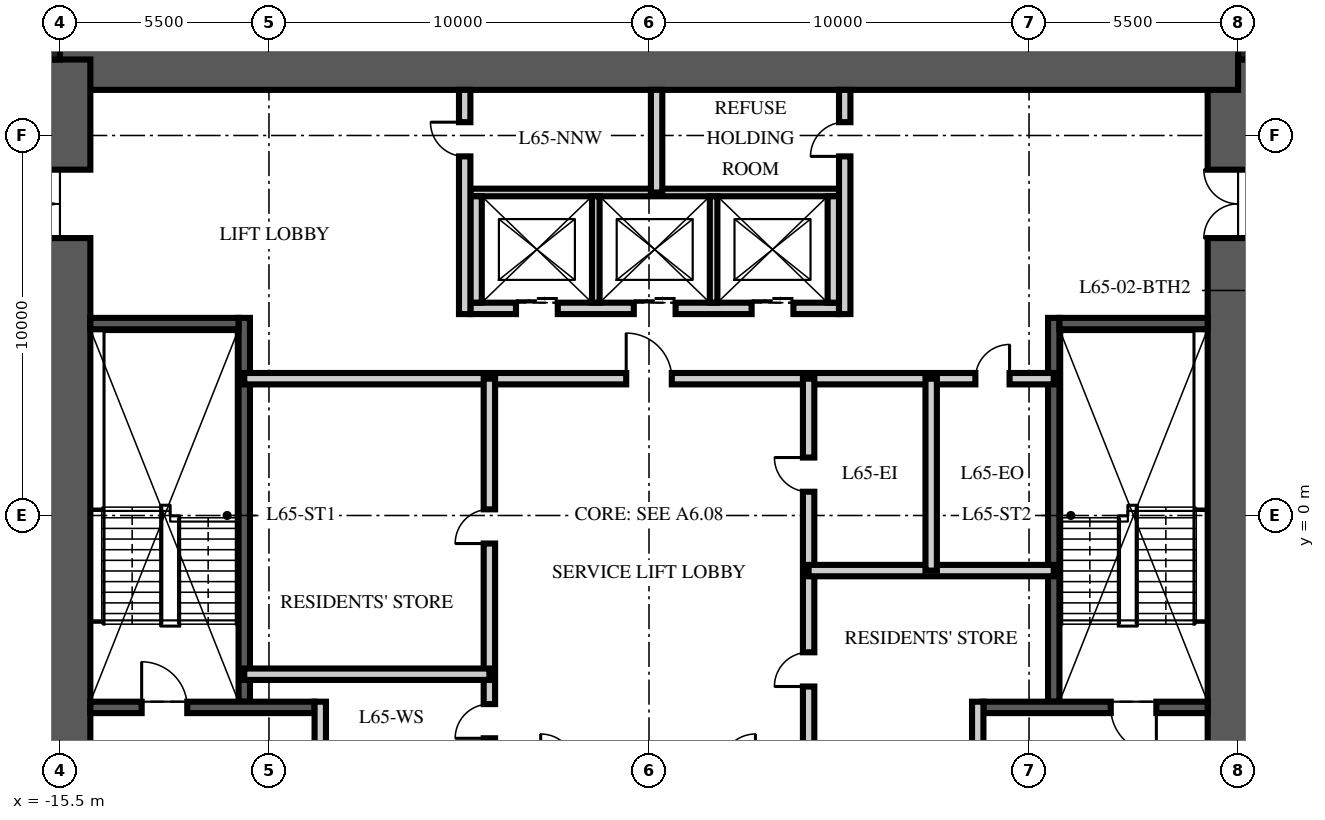
"""IFC4 building model, lengths in metres.
Left out: names, types, materials, properties, quantities, classifications, styles, units other than length and angle.
Written with IfcOpenShell. Run it as: python <this file> out.ifc"""

import sys

from ifc_helpers import new_model, si_unit, direction, frame, frame_2d, origin, origin_2d, place, context, subcontext, project, spatial, rectangle, extrude, element, fill, save


model = new_model("IFC4")
c1 = context("Model", 3, precision=1e-05, world=origin(), true_north=direction((0.0, 1.0)))
c2 = subcontext(c1, "Body", "Model", "MODEL_VIEW")
j1 = project(units=[si_unit("LENGTHUNIT", "METRE"), si_unit("PLANEANGLEUNIT", "RADIAN")], contexts=[c1])
p1 = place(None, origin())
s1 = spatial("IfcSite", under=j1, at=p1, CompositionType="ELEMENT")
p2 = place(p1, origin())
s2 = spatial("IfcBuilding", under=s1, at=p2, CompositionType="ELEMENT")
p3 = place(p2, frame((0.0, 0.0, 259.5)))
s3 = spatial("IfcBuildingStorey", under=s2, at=p3, CompositionType="ELEMENT", Elevation=259.5)
p4 = place(p3, frame((15.5, -12.0, -0.25), z_axis=(0.0, 0.0, 1.0), x_axis=(0.0, 1.0, 0.0)))
e1 = element("IfcWall", 1, at=p4, inside=s3, PredefinedType="SHEAR", context=c2, shape_type="SweptSolid", body=[
    extrude(rectangle(XDim=24.0, YDim=1.6, at=frame_2d((12.0, 0.0))), origin(), (0.0, 0.0, 1.0), 3.75),
])
p5 = place(p4, frame((3.2, 0.0, 0.25)))
e2 = element("IfcOpeningElement", 2, at=p5, cuts=e1, PredefinedType="OPENING", context=c2, shape_type="SweptSolid", body=[
    extrude(rectangle(XDim=1.2, YDim=2.1, at=frame_2d((0.6, 1.05))), frame((0.0, 0.81, 0.0), z_axis=(0.0, -1.0, 0.0), x_axis=(1.0, 0.0, 0.0)), (0.0, 0.0, 1.0), 1.62),
])
p6 = place(p4, frame((19.3, 0.0, 0.25)))
e3 = element("IfcOpeningElement", 3, at=p6, cuts=e1, PredefinedType="OPENING", context=c2, shape_type="SweptSolid", body=[
    extrude(rectangle(XDim=1.8, YDim=2.1, at=frame_2d((0.9, 1.05))), frame((0.0, 0.81, 0.0), z_axis=(0.0, -1.0, 0.0), x_axis=(1.0, 0.0, 0.0)), (0.0, 0.0, 1.0), 1.62),
])
p7 = place(p3, frame((-15.5, 12.0, -0.25), z_axis=(0.0, 0.0, 1.0), x_axis=(1.0, 0.0, 0.0)))
e4 = element("IfcWall", 4, at=p7, inside=s3, PredefinedType="SHEAR", context=c2, shape_type="SweptSolid", body=[
    extrude(rectangle(XDim=31.0, YDim=1.6, at=frame_2d((15.5, 0.0))), origin(), (0.0, 0.0, 1.0), 3.75),
])
p8 = place(p3, frame((-15.5, -12.0, -0.25), z_axis=(0.0, 0.0, 1.0), x_axis=(0.0, 1.0, 0.0)))
e5 = element("IfcWall", 5, at=p8, inside=s3, PredefinedType="SHEAR", context=c2, shape_type="SweptSolid", body=[
    extrude(rectangle(XDim=24.0, YDim=1.6, at=frame_2d((12.0, 0.0))), origin(), (0.0, 0.0, 1.0), 3.75),
])
p9 = place(p8, frame((3.2, 0.0, 0.25)))
e6 = element("IfcOpeningElement", 6, at=p9, cuts=e5, PredefinedType="OPENING", context=c2, shape_type="SweptSolid", body=[
    extrude(rectangle(XDim=1.2, YDim=2.1, at=frame_2d((0.6, 1.05))), frame((0.0, 0.81, 0.0), z_axis=(0.0, -1.0, 0.0), x_axis=(1.0, 0.0, 0.0)), (0.0, 0.0, 1.0), 1.62),
])
p10 = place(p8, frame((19.3, 0.0, 0.25)))
e7 = element("IfcOpeningElement", 7, at=p10, cuts=e5, PredefinedType="OPENING", context=c2, shape_type="SweptSolid", body=[
    extrude(rectangle(XDim=1.8, YDim=2.1, at=frame_2d((0.9, 1.05))), frame((0.0, 0.81, 0.0), z_axis=(0.0, -1.0, 0.0), x_axis=(1.0, 0.0, 0.0)), (0.0, 0.0, 1.0), 1.62),
])
for number, where, z_axis, x_axis in (
    (8, (15.9, 12.4, -0.25), (0.0, 0.0, 1.0), (1.0, 0.0, 0.0)),
    (9, (-15.9, 12.4, -0.25), (0.0, 0.0, 1.0), (1.0, 0.0, 0.0)),
):
    element("IfcColumn", number, at=place(p3, frame(where, z_axis=z_axis, x_axis=x_axis)), inside=s3, PredefinedType="COLUMN", context=c2, shape_type="SweptSolid", body=[
        extrude(rectangle(XDim=0.8, YDim=0.8, at=origin_2d()), origin(), (0.0, 0.0, 1.0), 3.75),
    ])
p11 = place(p3, frame((-10.65, -4.9, 0.0), z_axis=(0.0, 0.0, 1.0), x_axis=(0.0, 1.0, 0.0)))
e10 = element("IfcWall", 10, at=p11, inside=s3, PredefinedType="SOLIDWALL", context=c2, shape_type="SweptSolid", body=[
    extrude(rectangle(XDim=10.1, YDim=0.3, at=frame_2d((5.05, 0.0))), origin(), (0.0, 0.0, 1.0), 3.5),
])
p12 = place(p3, frame((-14.7, -5.05, 0.0), z_axis=(0.0, 0.0, 1.0), x_axis=(1.0, 0.0, 0.0)))
e11 = element("IfcWall", 11, at=p12, inside=s3, PredefinedType="SOLIDWALL", context=c2, shape_type="SweptSolid", body=[
    extrude(rectangle(XDim=5.9, YDim=0.3, at=frame_2d((2.95, 0.0))), origin(), (0.0, 0.0, 1.0), 3.5),
])
p13 = place(p12, frame((1.35, 0.0, 0.0)))
e12 = element("IfcOpeningElement", 12, at=p13, cuts=e11, PredefinedType="OPENING", context=c2, shape_type="SweptSolid", body=[
    extrude(rectangle(XDim=1.2, YDim=2.1, at=frame_2d((0.6, 1.05))), frame((0.0, 0.16, 0.0), z_axis=(0.0, -1.0, 0.0), x_axis=(1.0, 0.0, 0.0)), (0.0, 0.0, 1.0), 0.32),
])
p14 = place(p3, frame((-14.7, 5.05, 0.0), z_axis=(0.0, 0.0, 1.0), x_axis=(1.0, 0.0, 0.0)))
e13 = element("IfcWall", 13, at=p14, inside=s3, PredefinedType="SOLIDWALL", context=c2, shape_type="SweptSolid", body=[
    extrude(rectangle(XDim=3.9, YDim=0.3, at=frame_2d((1.95, 0.0))), origin(), (0.0, 0.0, 1.0), 3.5),
])
p15 = place(p3, frame((-8.65, -11.2, 0.0), z_axis=(0.0, 0.0, 1.0), x_axis=(0.0, 1.0, 0.0)))
e14 = element("IfcWall", 14, at=p15, inside=s3, PredefinedType="PARTITIONING", context=c2, shape_type="SweptSolid", body=[
    extrude(rectangle(XDim=6.3, YDim=0.3, at=frame_2d((3.15, 0.0))), origin(), (0.0, 0.0, 1.0), 3.5),
])
p16 = place(p15, frame((2.45, 0.0, 0.0)))
e15 = element("IfcOpeningElement", 15, at=p16, cuts=e14, PredefinedType="OPENING", context=c2, shape_type="SweptSolid", body=[
    extrude(rectangle(XDim=1.1, YDim=2.1, at=frame_2d((0.55, 1.05))), frame((0.0, 0.16, 0.0), z_axis=(0.0, -1.0, 0.0), x_axis=(1.0, 0.0, 0.0)), (0.0, 0.0, 1.0), 0.32),
])
p17 = place(p3, frame((10.65, -4.9, 0.0), z_axis=(0.0, 0.0, 1.0), x_axis=(0.0, 1.0, 0.0)))
e16 = element("IfcWall", 16, at=p17, inside=s3, PredefinedType="SOLIDWALL", context=c2, shape_type="SweptSolid", body=[
    extrude(rectangle(XDim=10.1, YDim=0.3, at=frame_2d((5.05, 0.0))), origin(), (0.0, 0.0, 1.0), 3.5),
])
p18 = place(p3, frame((14.7, -5.05, 0.0), z_axis=(0.0, 0.0, 1.0), x_axis=(-1.0, 0.0, 0.0)))
e17 = element("IfcWall", 17, at=p18, inside=s3, PredefinedType="SOLIDWALL", context=c2, shape_type="SweptSolid", body=[
    extrude(rectangle(XDim=5.9, YDim=0.3, at=frame_2d((2.95, 0.0))), origin(), (0.0, 0.0, 1.0), 3.5),
])
p19 = place(p18, frame((1.35, 0.0, 0.0)))
e18 = element("IfcOpeningElement", 18, at=p19, cuts=e17, PredefinedType="OPENING", context=c2, shape_type="SweptSolid", body=[
    extrude(rectangle(XDim=1.2, YDim=2.1, at=frame_2d((0.6, 1.05))), frame((0.0, 0.16, 0.0), z_axis=(0.0, -1.0, 0.0), x_axis=(1.0, 0.0, 0.0)), (0.0, 0.0, 1.0), 0.32),
])
p20 = place(p3, frame((14.7, 5.05, 0.0), z_axis=(0.0, 0.0, 1.0), x_axis=(-1.0, 0.0, 0.0)))
e19 = element("IfcWall", 19, at=p20, inside=s3, PredefinedType="SOLIDWALL", context=c2, shape_type="SweptSolid", body=[
    extrude(rectangle(XDim=3.9, YDim=0.3, at=frame_2d((1.95, 0.0))), origin(), (0.0, 0.0, 1.0), 3.5),
])
p21 = place(p3, frame((8.65, -11.2, 0.0), z_axis=(0.0, 0.0, 1.0), x_axis=(0.0, 1.0, 0.0)))
e20 = element("IfcWall", 20, at=p21, inside=s3, PredefinedType="PARTITIONING", context=c2, shape_type="SweptSolid", body=[
    extrude(rectangle(XDim=6.3, YDim=0.3, at=frame_2d((3.15, 0.0))), origin(), (0.0, 0.0, 1.0), 3.5),
])
p22 = place(p21, frame((2.45, 0.0, 0.0)))
e21 = element("IfcOpeningElement", 21, at=p22, cuts=e20, PredefinedType="OPENING", context=c2, shape_type="SweptSolid", body=[
    extrude(rectangle(XDim=1.1, YDim=2.1, at=frame_2d((0.55, 1.05))), frame((0.0, 0.16, 0.0), z_axis=(0.0, -1.0, 0.0), x_axis=(1.0, 0.0, 0.0)), (0.0, 0.0, 1.0), 0.32),
])
p23 = place(p3, frame((-4.7, 5.45, 0.0), z_axis=(0.0, 0.0, 1.0), x_axis=(1.0, 0.0, 0.0)))
e22 = element("IfcWall", 22, at=p23, inside=s3, PredefinedType="PARTITIONING", context=c2, shape_type="SweptSolid", body=[
    extrude(rectangle(XDim=9.7, YDim=0.3, at=frame_2d((4.85, 0.0))), origin(), (0.0, 0.0, 1.0), 3.5),
])
p24 = place(p23, frame((1.2, 0.0, 0.0)))
e23 = element("IfcOpeningElement", 23, at=p24, cuts=e22, PredefinedType="OPENING", context=c2, shape_type="SweptSolid", body=[
    extrude(rectangle(XDim=1.1, YDim=2.1, at=frame_2d((0.55, 1.05))), frame((0.0, 0.16, 0.0), z_axis=(0.0, -1.0, 0.0), x_axis=(1.0, 0.0, 0.0)), (0.0, 0.0, 1.0), 0.32),
])
p25 = place(p23, frame((4.3, 0.0, 0.0)))
e24 = element("IfcOpeningElement", 24, at=p25, cuts=e22, PredefinedType="OPENING", context=c2, shape_type="SweptSolid", body=[
    extrude(rectangle(XDim=1.1, YDim=2.1, at=frame_2d((0.55, 1.05))), frame((0.0, 0.16, 0.0), z_axis=(0.0, -1.0, 0.0), x_axis=(1.0, 0.0, 0.0)), (0.0, 0.0, 1.0), 0.32),
])
p26 = place(p23, frame((7.4, 0.0, 0.0)))
e25 = element("IfcOpeningElement", 25, at=p26, cuts=e22, PredefinedType="OPENING", context=c2, shape_type="SweptSolid", body=[
    extrude(rectangle(XDim=1.1, YDim=2.1, at=frame_2d((0.55, 1.05))), frame((0.0, 0.16, 0.0), z_axis=(0.0, -1.0, 0.0), x_axis=(1.0, 0.0, 0.0)), (0.0, 0.0, 1.0), 0.32),
])
p27 = place(p3, frame((-4.7, 8.5, 0.0), z_axis=(0.0, 0.0, 1.0), x_axis=(1.0, 0.0, 0.0)))
e26 = element("IfcWall", 26, at=p27, inside=s3, PredefinedType="PARTITIONING", context=c2, shape_type="SweptSolid", body=[
    extrude(rectangle(XDim=9.7, YDim=0.2, at=frame_2d((4.85, 0.0))), origin(), (0.0, 0.0, 1.0), 3.5),
])
for number, where, z_axis, x_axis in (
    (27, (-4.55, 5.6, 0.0), (0.0, 0.0, 1.0), (0.0, 1.0, 0.0)),
    (28, (4.85, 5.6, 0.0), (0.0, 0.0, 1.0), (0.0, 1.0, 0.0)),
):
    element("IfcWall", number, at=place(p3, frame(where, z_axis=z_axis, x_axis=x_axis)), inside=s3, PredefinedType="PARTITIONING", context=c2, shape_type="SweptSolid", body=[
        extrude(rectangle(XDim=2.8, YDim=0.3, at=frame_2d((1.4, 0.0))), origin(), (0.0, 0.0, 1.0), 3.5),
    ])
for number, where, z_axis, x_axis in (
    (29, (-1.4, 5.6, 0.0), (0.0, 0.0, 1.0), (0.0, 1.0, 0.0)),
    (30, (1.7, 5.6, 0.0), (0.0, 0.0, 1.0), (0.0, 1.0, 0.0)),
):
    element("IfcWall", number, at=place(p3, frame(where, z_axis=z_axis, x_axis=x_axis)), inside=s3, PredefinedType="PARTITIONING", context=c2, shape_type="SweptSolid", body=[
        extrude(rectangle(XDim=2.8, YDim=0.2, at=frame_2d((1.4, 0.0))), origin(), (0.0, 0.0, 1.0), 3.5),
    ])
p28 = place(p3, frame((-10.65, 3.6, 0.0), z_axis=(0.0, 0.0, 1.0), x_axis=(1.0, 0.0, 0.0)))
e31 = element("IfcWall", 31, at=p28, inside=s3, PredefinedType="PARTITIONING", context=c2, shape_type="SweptSolid", body=[
    extrude(rectangle(XDim=21.3, YDim=0.3, at=frame_2d((10.65, 0.0))), origin(), (0.0, 0.0, 1.0), 3.5),
])
p29 = place(p28, frame((10.05, 0.0, 0.0)))
e32 = element("IfcOpeningElement", 32, at=p29, cuts=e31, PredefinedType="OPENING", context=c2, shape_type="SweptSolid", body=[
    extrude(rectangle(XDim=1.2, YDim=2.1, at=frame_2d((0.6, 1.05))), frame((0.0, 0.16, 0.0), z_axis=(0.0, -1.0, 0.0), x_axis=(1.0, 0.0, 0.0)), (0.0, 0.0, 1.0), 0.32),
])
p30 = place(p28, frame((19.238, 0.0, 0.0)))
e33 = element("IfcOpeningElement", 33, at=p30, cuts=e31, PredefinedType="OPENING", context=c2, shape_type="SweptSolid", body=[
    extrude(rectangle(XDim=0.9, YDim=2.1, at=frame_2d((0.45, 1.05))), frame((0.0, 0.16, 0.0), z_axis=(0.0, -1.0, 0.0), x_axis=(1.0, 0.0, 0.0)), (0.0, 0.0, 1.0), 0.32),
])
p31 = place(p3, frame((-4.2, -6.65, 0.0), z_axis=(0.0, 0.0, 1.0), x_axis=(0.0, 1.0, 0.0)))
e34 = element("IfcWall", 34, at=p31, inside=s3, PredefinedType="PARTITIONING", context=c2, shape_type="SweptSolid", body=[
    extrude(rectangle(XDim=10.25, YDim=0.3, at=frame_2d((5.125, 0.0))), origin(), (0.0, 0.0, 1.0), 3.5),
])
p32 = place(p31, frame((0.787, 0.0, 0.0)))
e35 = element("IfcOpeningElement", 35, at=p32, cuts=e34, PredefinedType="OPENING", context=c2, shape_type="SweptSolid", body=[
    extrude(rectangle(XDim=0.9, YDim=2.1, at=frame_2d((0.45, 1.05))), frame((0.0, 0.16, 0.0), z_axis=(0.0, -1.0, 0.0), x_axis=(1.0, 0.0, 0.0)), (0.0, 0.0, 1.0), 0.32),
])
p33 = place(p31, frame((5.912, 0.0, 0.0)))
e36 = element("IfcOpeningElement", 36, at=p33, cuts=e34, PredefinedType="OPENING", context=c2, shape_type="SweptSolid", body=[
    extrude(rectangle(XDim=0.9, YDim=2.1, at=frame_2d((0.45, 1.05))), frame((0.0, 0.16, 0.0), z_axis=(0.0, -1.0, 0.0), x_axis=(1.0, 0.0, 0.0)), (0.0, 0.0, 1.0), 0.32),
])
p34 = place(p3, frame((4.2, -6.65, 0.0), z_axis=(0.0, 0.0, 1.0), x_axis=(0.0, 1.0, 0.0)))
e37 = element("IfcWall", 37, at=p34, inside=s3, PredefinedType="PARTITIONING", context=c2, shape_type="SweptSolid", body=[
    extrude(rectangle(XDim=10.25, YDim=0.3, at=frame_2d((5.125, 0.0))), origin(), (0.0, 0.0, 1.0), 3.5),
])
p35 = place(p34, frame((2.15, 0.0, 0.0)))
e38 = element("IfcOpeningElement", 38, at=p35, cuts=e37, PredefinedType="OPENING", context=c2, shape_type="SweptSolid", body=[
    extrude(rectangle(XDim=0.9, YDim=2.1, at=frame_2d((0.45, 1.05))), frame((0.0, 0.16, 0.0), z_axis=(0.0, -1.0, 0.0), x_axis=(1.0, 0.0, 0.0)), (0.0, 0.0, 1.0), 0.32),
])
p36 = place(p34, frame((7.275, 0.0, 0.0)))
e39 = element("IfcOpeningElement", 39, at=p36, cuts=e37, PredefinedType="OPENING", context=c2, shape_type="SweptSolid", body=[
    extrude(rectangle(XDim=0.9, YDim=2.1, at=frame_2d((0.45, 1.05))), frame((0.0, 0.16, 0.0), z_axis=(0.0, -1.0, 0.0), x_axis=(1.0, 0.0, 0.0)), (0.0, 0.0, 1.0), 0.32),
])
for number, where, z_axis, x_axis in (
    (40, (-10.65, -4.177, 0.0), (0.0, 0.0, 1.0), (1.0, 0.0, 0.0)),
    (41, (10.65, -1.45, 0.0), (0.0, 0.0, 1.0), (-1.0, 0.0, 0.0)),
):
    element("IfcWall", number, at=place(p3, frame(where, z_axis=z_axis, x_axis=x_axis)), inside=s3, PredefinedType="PARTITIONING", context=c2, shape_type="SweptSolid", body=[
        extrude(rectangle(XDim=6.45, YDim=0.3, at=frame_2d((3.225, 0.0))), origin(), (0.0, 0.0, 1.0), 3.5),
    ])
p37 = place(p3, frame((7.425, -1.45, 0.0), z_axis=(0.0, 0.0, 1.0), x_axis=(0.0, 1.0, 0.0)))
e42 = element("IfcWall", 42, at=p37, inside=s3, PredefinedType="PARTITIONING", context=c2, shape_type="SweptSolid", body=[
    extrude(rectangle(XDim=5.05, YDim=0.3, at=frame_2d((2.525, 0.0))), origin(), (0.0, 0.0, 1.0), 3.5),
])
p38 = place(p3, frame((-4.85, 5.3, 0.0), z_axis=(0.0, 0.0, 1.0), x_axis=(0.0, 1.0, 0.0)))
e43 = element("IfcWall", 43, at=p38, inside=s3, PredefinedType="PARTITIONING", context=c2, shape_type="SweptSolid", body=[
    extrude(rectangle(XDim=5.9, YDim=0.3, at=frame_2d((2.95, 0.0))), origin(), (0.0, 0.0, 1.0), 3.5),
])
p39 = place(p38, frame((4.15, 0.0, 0.0)))
e44 = element("IfcOpeningElement", 44, at=p39, cuts=e43, PredefinedType="OPENING", context=c2, shape_type="SweptSolid", body=[
    extrude(rectangle(XDim=0.9, YDim=2.1, at=frame_2d((0.45, 1.05))), frame((0.0, 0.16, 0.0), z_axis=(0.0, -1.0, 0.0), x_axis=(1.0, 0.0, 0.0)), (0.0, 0.0, 1.0), 0.32),
])
p40 = place(p3, frame((5.15, 5.3, 0.0), z_axis=(0.0, 0.0, 1.0), x_axis=(0.0, 1.0, 0.0)))
e45 = element("IfcWall", 45, at=p40, inside=s3, PredefinedType="PARTITIONING", context=c2, shape_type="SweptSolid", body=[
    extrude(rectangle(XDim=5.9, YDim=0.3, at=frame_2d((2.95, 0.0))), origin(), (0.0, 0.0, 1.0), 3.5),
])
p41 = place(p40, frame((4.15, 0.0, 0.0)))
e46 = element("IfcOpeningElement", 46, at=p41, cuts=e45, PredefinedType="OPENING", context=c2, shape_type="SweptSolid", body=[
    extrude(rectangle(XDim=0.9, YDim=2.1, at=frame_2d((0.45, 1.05))), frame((0.0, 0.16, 0.0), z_axis=(0.0, -1.0, 0.0), x_axis=(1.0, 0.0, 0.0)), (0.0, 0.0, 1.0), 0.32),
])
p42 = place(p3, frame((0.2, 8.5, 0.0), z_axis=(0.0, 0.0, 1.0), x_axis=(0.0, 1.0, 0.0)))
e47 = element("IfcWall", 47, at=p42, inside=s3, PredefinedType="PARTITIONING", context=c2, shape_type="SweptSolid", body=[
    extrude(rectangle(XDim=2.7, YDim=0.3, at=frame_2d((1.35, 0.0))), origin(), (0.0, 0.0, 1.0), 3.5),
])
p43 = place(p13, origin())
e48 = element("IfcDoor", 48, at=p43, inside=s3, OperationType="SINGLE_SWING_LEFT", PredefinedType="DOOR", context=c2, shape_type="SweptSolid", body=[
    extrude(rectangle(XDim=1.2, YDim=2.1, at=frame_2d((0.6, 1.05))), frame((0.0, 0.025, 0.0), z_axis=(0.0, -1.0, 0.0), x_axis=(1.0, 0.0, 0.0)), (0.0, 0.0, 1.0), 0.05),
])
fill(e12, e48)
p44 = place(p10, origin())
e49 = element("IfcDoor", 49, at=p44, inside=s3, OperationType="DOUBLE_DOOR_SINGLE_SWING", PredefinedType="DOOR", context=c2, shape_type="SweptSolid", body=[
    extrude(rectangle(XDim=1.8, YDim=2.1, at=frame_2d((0.9, 1.05))), frame((0.0, 0.025, 0.0), z_axis=(0.0, -1.0, 0.0), x_axis=(1.0, 0.0, 0.0)), (0.0, 0.0, 1.0), 0.05),
])
fill(e7, e49)
p45 = place(p19, origin())
e50 = element("IfcDoor", 50, at=p45, inside=s3, OperationType="SINGLE_SWING_LEFT", PredefinedType="DOOR", context=c2, shape_type="SweptSolid", body=[
    extrude(rectangle(XDim=1.2, YDim=2.1, at=frame_2d((0.6, 1.05))), frame((0.0, 0.025, 0.0), z_axis=(0.0, -1.0, 0.0), x_axis=(1.0, 0.0, 0.0)), (0.0, 0.0, 1.0), 0.05),
])
fill(e18, e50)
p46 = place(p6, origin())
e51 = element("IfcDoor", 51, at=p46, inside=s3, OperationType="DOUBLE_DOOR_SINGLE_SWING", PredefinedType="DOOR", context=c2, shape_type="SweptSolid", body=[
    extrude(rectangle(XDim=1.8, YDim=2.1, at=frame_2d((0.9, 1.05))), frame((0.0, 0.025, 0.0), z_axis=(0.0, -1.0, 0.0), x_axis=(1.0, 0.0, 0.0)), (0.0, 0.0, 1.0), 0.05),
])
fill(e3, e51)
p47 = place(p24, origin())
e52 = element("IfcDoor", 52, at=p47, inside=s3, OperationType="DOUBLE_DOOR_SLIDING", PredefinedType="DOOR", context=c2, shape_type="SweptSolid", body=[
    extrude(rectangle(XDim=1.1, YDim=2.1, at=frame_2d((0.55, 1.05))), frame((0.0, 0.025, 0.0), z_axis=(0.0, -1.0, 0.0), x_axis=(1.0, 0.0, 0.0)), (0.0, 0.0, 1.0), 0.05),
])
fill(e23, e52)
p48 = place(p25, origin())
e53 = element("IfcDoor", 53, at=p48, inside=s3, OperationType="DOUBLE_DOOR_SLIDING", PredefinedType="DOOR", context=c2, shape_type="SweptSolid", body=[
    extrude(rectangle(XDim=1.1, YDim=2.1, at=frame_2d((0.55, 1.05))), frame((0.0, 0.025, 0.0), z_axis=(0.0, -1.0, 0.0), x_axis=(1.0, 0.0, 0.0)), (0.0, 0.0, 1.0), 0.05),
])
fill(e24, e53)
p49 = place(p26, origin())
e54 = element("IfcDoor", 54, at=p49, inside=s3, OperationType="DOUBLE_DOOR_SLIDING", PredefinedType="DOOR", context=c2, shape_type="SweptSolid", body=[
    extrude(rectangle(XDim=1.1, YDim=2.1, at=frame_2d((0.55, 1.05))), frame((0.0, 0.025, 0.0), z_axis=(0.0, -1.0, 0.0), x_axis=(1.0, 0.0, 0.0)), (0.0, 0.0, 1.0), 0.05),
])
fill(e25, e54)
p50 = place(p29, origin())
e55 = element("IfcDoor", 55, at=p50, inside=s3, OperationType="SINGLE_SWING_LEFT", PredefinedType="DOOR", context=c2, shape_type="SweptSolid", body=[
    extrude(rectangle(XDim=1.2, YDim=2.1, at=frame_2d((0.6, 1.05))), frame((0.0, 0.025, 0.0), z_axis=(0.0, -1.0, 0.0), x_axis=(1.0, 0.0, 0.0)), (0.0, 0.0, 1.0), 0.05),
])
fill(e32, e55)
p51 = place(p32, origin())
e56 = element("IfcDoor", 56, at=p51, inside=s3, OperationType="SINGLE_SWING_LEFT", PredefinedType="DOOR", context=c2, shape_type="SweptSolid", body=[
    extrude(rectangle(XDim=0.9, YDim=2.1, at=frame_2d((0.45, 1.05))), frame((0.0, 0.025, 0.0), z_axis=(0.0, -1.0, 0.0), x_axis=(1.0, 0.0, 0.0)), (0.0, 0.0, 1.0), 0.05),
])
fill(e35, e56)
p52 = place(p33, origin())
e57 = element("IfcDoor", 57, at=p52, inside=s3, OperationType="SINGLE_SWING_LEFT", PredefinedType="DOOR", context=c2, shape_type="SweptSolid", body=[
    extrude(rectangle(XDim=0.9, YDim=2.1, at=frame_2d((0.45, 1.05))), frame((0.0, 0.025, 0.0), z_axis=(0.0, -1.0, 0.0), x_axis=(1.0, 0.0, 0.0)), (0.0, 0.0, 1.0), 0.05),
])
fill(e36, e57)
p53 = place(p35, origin())
e58 = element("IfcDoor", 58, at=p53, inside=s3, OperationType="SINGLE_SWING_LEFT", PredefinedType="DOOR", context=c2, shape_type="SweptSolid", body=[
    extrude(rectangle(XDim=0.9, YDim=2.1, at=frame_2d((0.45, 1.05))), frame((0.0, 0.025, 0.0), z_axis=(0.0, -1.0, 0.0), x_axis=(1.0, 0.0, 0.0)), (0.0, 0.0, 1.0), 0.05),
])
fill(e38, e58)
p54 = place(p36, origin())
e59 = element("IfcDoor", 59, at=p54, inside=s3, OperationType="SINGLE_SWING_RIGHT", PredefinedType="DOOR", context=c2, shape_type="SweptSolid", body=[
    extrude(rectangle(XDim=0.9, YDim=2.1, at=frame_2d((0.45, 1.05))), frame((0.0, 0.025, 0.0), z_axis=(0.0, -1.0, 0.0), x_axis=(1.0, 0.0, 0.0)), (0.0, 0.0, 1.0), 0.05),
])
fill(e39, e59)
p55 = place(p30, origin())
e60 = element("IfcDoor", 60, at=p55, inside=s3, OperationType="SINGLE_SWING_RIGHT", PredefinedType="DOOR", context=c2, shape_type="SweptSolid", body=[
    extrude(rectangle(XDim=0.9, YDim=2.1, at=frame_2d((0.45, 1.05))), frame((0.0, 0.025, 0.0), z_axis=(0.0, -1.0, 0.0), x_axis=(1.0, 0.0, 0.0)), (0.0, 0.0, 1.0), 0.05),
])
fill(e33, e60)
p56 = place(p39, origin())
e61 = element("IfcDoor", 61, at=p56, inside=s3, OperationType="SINGLE_SWING_RIGHT", PredefinedType="DOOR", context=c2, shape_type="SweptSolid", body=[
    extrude(rectangle(XDim=0.9, YDim=2.1, at=frame_2d((0.45, 1.05))), frame((0.0, 0.025, 0.0), z_axis=(0.0, -1.0, 0.0), x_axis=(1.0, 0.0, 0.0)), (0.0, 0.0, 1.0), 0.05),
])
fill(e44, e61)
p57 = place(p41, origin())
e62 = element("IfcDoor", 62, at=p57, inside=s3, OperationType="SINGLE_SWING_LEFT", PredefinedType="DOOR", context=c2, shape_type="SweptSolid", body=[
    extrude(rectangle(XDim=0.9, YDim=2.1, at=frame_2d((0.45, 1.05))), frame((0.0, 0.025, 0.0), z_axis=(0.0, -1.0, 0.0), x_axis=(1.0, 0.0, 0.0)), (0.0, 0.0, 1.0), 0.05),
])
fill(e46, e62)
save(model, sys.argv[1])
